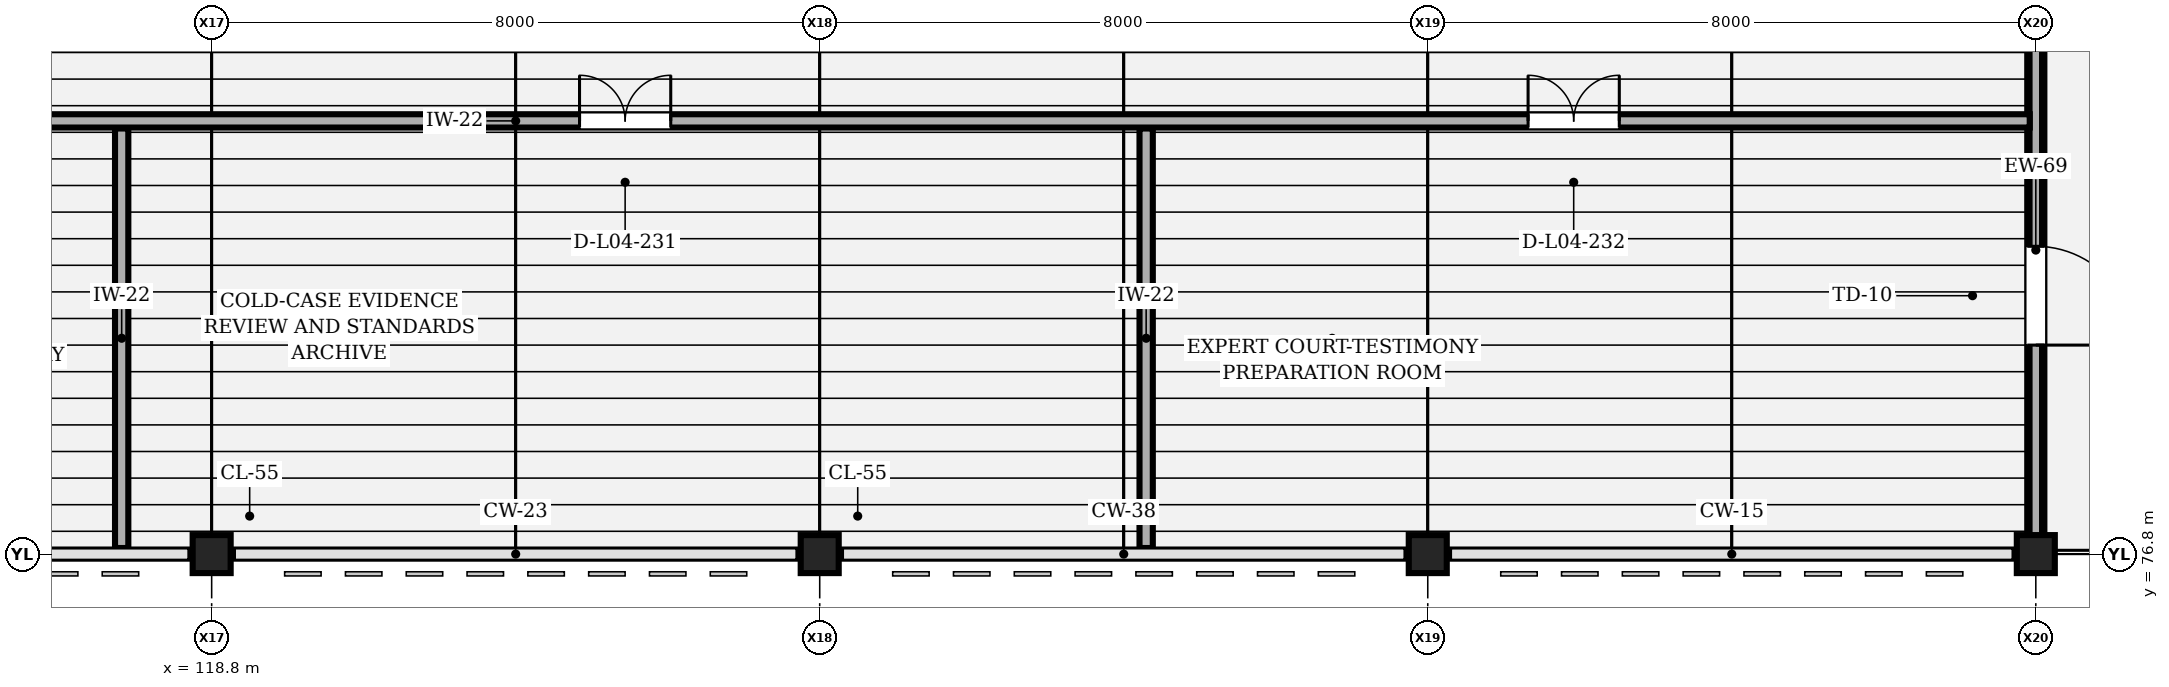
"""IFC4 building model, lengths in metres.
Left out: names, types, materials, properties, quantities, classifications, styles, units other than length and angle.
Written with IfcOpenShell. Run it as: python <this file> out.ifc"""

import sys

from ifc_helpers import new_model, si_unit, direction, frame, frame_2d, origin, origin_2d, place, context, subcontext, project, spatial, rectangle, extrude, element, fill, save


model = new_model("IFC4")
c1 = context("Model", 3, precision=1e-05, world=origin(), true_north=direction((0.0, 1.0)))
c2 = subcontext(c1, "Body", "Model", "MODEL_VIEW")
j1 = project(units=[si_unit("LENGTHUNIT", "METRE"), si_unit("PLANEANGLEUNIT", "RADIAN")], contexts=[c1])
p1 = place(None, origin())
s1 = spatial("IfcSite", under=j1, at=p1, CompositionType="ELEMENT")
p2 = place(p1, origin())
s2 = spatial("IfcBuilding", under=s1, at=p2, CompositionType="ELEMENT")
p3 = place(p2, frame((0.0, 0.0, 18.0)))
s3 = spatial("IfcBuildingStorey", under=s2, at=p3, CompositionType="ELEMENT", Elevation=18.0)
for number, where, z_axis, x_axis in (
    (1, (118.8, 76.8, 0.0), (0.0, 0.0, 1.0), (1.0, 0.0, 0.0)),
    (2, (126.8, 76.8, 0.0), (0.0, 0.0, 1.0), (1.0, 0.0, 0.0)),
    (3, (134.8, 76.8, 0.0), (0.0, 0.0, 1.0), (1.0, 0.0, 0.0)),
    (4, (142.8, 76.8, 0.0), (0.0, 0.0, 1.0), (1.0, 0.0, 0.0)),
):
    element("IfcColumn", number, at=place(p3, frame(where, z_axis=z_axis, x_axis=x_axis)), inside=s3, PredefinedType="COLUMN", context=c2, shape_type="SweptSolid", body=[
        extrude(rectangle(XDim=0.5, YDim=0.5, at=origin_2d()), origin(), (0.0, 0.0, 1.0), 3.9),
    ])
p4 = place(p3, frame((142.8, 77.05, 0.0), z_axis=(0.0, 0.0, 1.0), x_axis=(0.0, 1.0, 0.0)))
e5 = element("IfcWall", 5, at=p4, inside=s3, PredefinedType="SOLIDWALL", context=c2, shape_type="SweptSolid", body=[
    extrude(rectangle(XDim=7.5, YDim=0.225, at=frame_2d((3.75, 0.0))), origin(), (0.0, 0.0, 1.0), 2.98),
])
p5 = place(p4, frame((2.5, 0.0, 0.0)))
e6 = element("IfcOpeningElement", 6, at=p5, cuts=e5, PredefinedType="OPENING", context=c2, shape_type="SweptSolid", body=[
    extrude(rectangle(XDim=1.3, YDim=2.2, at=frame_2d((0.65, 1.1))), frame((0.0, 0.123, 0.0), z_axis=(0.0, -1.0, 0.0), x_axis=(1.0, 0.0, 0.0)), (0.0, 0.0, 1.0), 0.245),
])
p6 = place(p3, frame((142.8, 76.8, 3.9), z_axis=(0.0, 0.0, 1.0), x_axis=(0.0, 1.0, 0.0)))
e7 = element("IfcWall", 7, at=p6, inside=s3, PredefinedType="PARAPET", context=c2, shape_type="SweptSolid", body=[
    extrude(rectangle(XDim=16.0, YDim=0.165, at=frame_2d((8.0, 0.0))), origin(), (0.0, 0.0, 1.0), 0.85),
])
for number, where, z_axis, x_axis in (
    (8, (117.616, 76.88, 0.0), (0.0, 0.0, 1.0), (0.0, 1.0, 0.0)),
    (9, (131.095, 76.88, 0.0), (0.0, 0.0, 1.0), (0.0, 1.0, 0.0)),
):
    element("IfcWall", number, at=place(p3, frame(where, z_axis=z_axis, x_axis=x_axis)), inside=s3, PredefinedType="PARTITIONING", context=c2, shape_type="SweptSolid", body=[
        extrude(rectangle(XDim=5.52, YDim=0.175, at=frame_2d((2.76, 0.0))), origin(), (0.0, 0.0, 1.0), 2.965),
    ])
p7 = place(p3, frame((102.88, 82.5, 0.0), z_axis=(0.0, 0.0, 1.0), x_axis=(1.0, 0.0, 0.0)))
e10 = element("IfcWall", 10, at=p7, inside=s3, PredefinedType="PARTITIONING", context=c2, shape_type="SweptSolid", body=[
    extrude(rectangle(XDim=39.84, YDim=0.175, at=frame_2d((19.92, 0.0))), origin(), (0.0, 0.0, 1.0), 2.965),
])
p8 = place(p7, frame((6.72, 0.0, 0.0)))
e11 = element("IfcOpeningElement", 11, at=p8, cuts=e10, PredefinedType="OPENING", context=c2, shape_type="SweptSolid", body=[
    extrude(rectangle(XDim=1.2, YDim=2.2, at=frame_2d((0.6, 1.1))), frame((0.0, 0.098, 0.0), z_axis=(0.0, -1.0, 0.0), x_axis=(1.0, 0.0, 0.0)), (0.0, 0.0, 1.0), 0.195),
])
p9 = place(p7, frame((20.76, 0.0, 0.0)))
e12 = element("IfcOpeningElement", 12, at=p9, cuts=e10, PredefinedType="OPENING", context=c2, shape_type="SweptSolid", body=[
    extrude(rectangle(XDim=1.2, YDim=2.2, at=frame_2d((0.6, 1.1))), frame((0.0, 0.098, 0.0), z_axis=(0.0, -1.0, 0.0), x_axis=(1.0, 0.0, 0.0)), (0.0, 0.0, 1.0), 0.195),
])
p10 = place(p7, frame((33.24, 0.0, 0.0)))
e13 = element("IfcOpeningElement", 13, at=p10, cuts=e10, PredefinedType="OPENING", context=c2, shape_type="SweptSolid", body=[
    extrude(rectangle(XDim=1.2, YDim=2.2, at=frame_2d((0.6, 1.1))), frame((0.0, 0.098, 0.0), z_axis=(0.0, -1.0, 0.0), x_axis=(1.0, 0.0, 0.0)), (0.0, 0.0, 1.0), 0.195),
])
p11 = place(p5, frame((1.3, 0.0, 0.0), z_axis=(0.0, 0.0, 1.0), x_axis=(-1.0, 0.0, 0.0)))
e14 = element("IfcDoor", 14, at=p11, inside=s3, OperationType="SINGLE_SWING_RIGHT", PredefinedType="DOOR", context=c2, shape_type="SweptSolid", body=[
    extrude(rectangle(XDim=1.3, YDim=2.2, at=frame_2d((0.65, 1.1))), frame((0.0, 0.025, 0.0), z_axis=(0.0, -1.0, 0.0), x_axis=(1.0, 0.0, 0.0)), (0.0, 0.0, 1.0), 0.05),
])
fill(e6, e14)
p12 = place(p9, origin())
e15 = element("IfcDoor", 15, at=p12, inside=s3, OperationType="DOUBLE_DOOR_SINGLE_SWING", PredefinedType="DOOR", context=c2, shape_type="SweptSolid", body=[
    extrude(rectangle(XDim=1.2, YDim=2.2, at=frame_2d((0.6, 1.1))), frame((0.0, 0.025, 0.0), z_axis=(0.0, -1.0, 0.0), x_axis=(1.0, 0.0, 0.0)), (0.0, 0.0, 1.0), 0.05),
])
fill(e12, e15)
p13 = place(p10, origin())
e16 = element("IfcDoor", 16, at=p13, inside=s3, OperationType="DOUBLE_DOOR_SINGLE_SWING", PredefinedType="DOOR", context=c2, shape_type="SweptSolid", body=[
    extrude(rectangle(XDim=1.2, YDim=2.2, at=frame_2d((0.6, 1.1))), frame((0.0, 0.025, 0.0), z_axis=(0.0, -1.0, 0.0), x_axis=(1.0, 0.0, 0.0)), (0.0, 0.0, 1.0), 0.05),
])
fill(e13, e16)
save(model, sys.argv[1])
